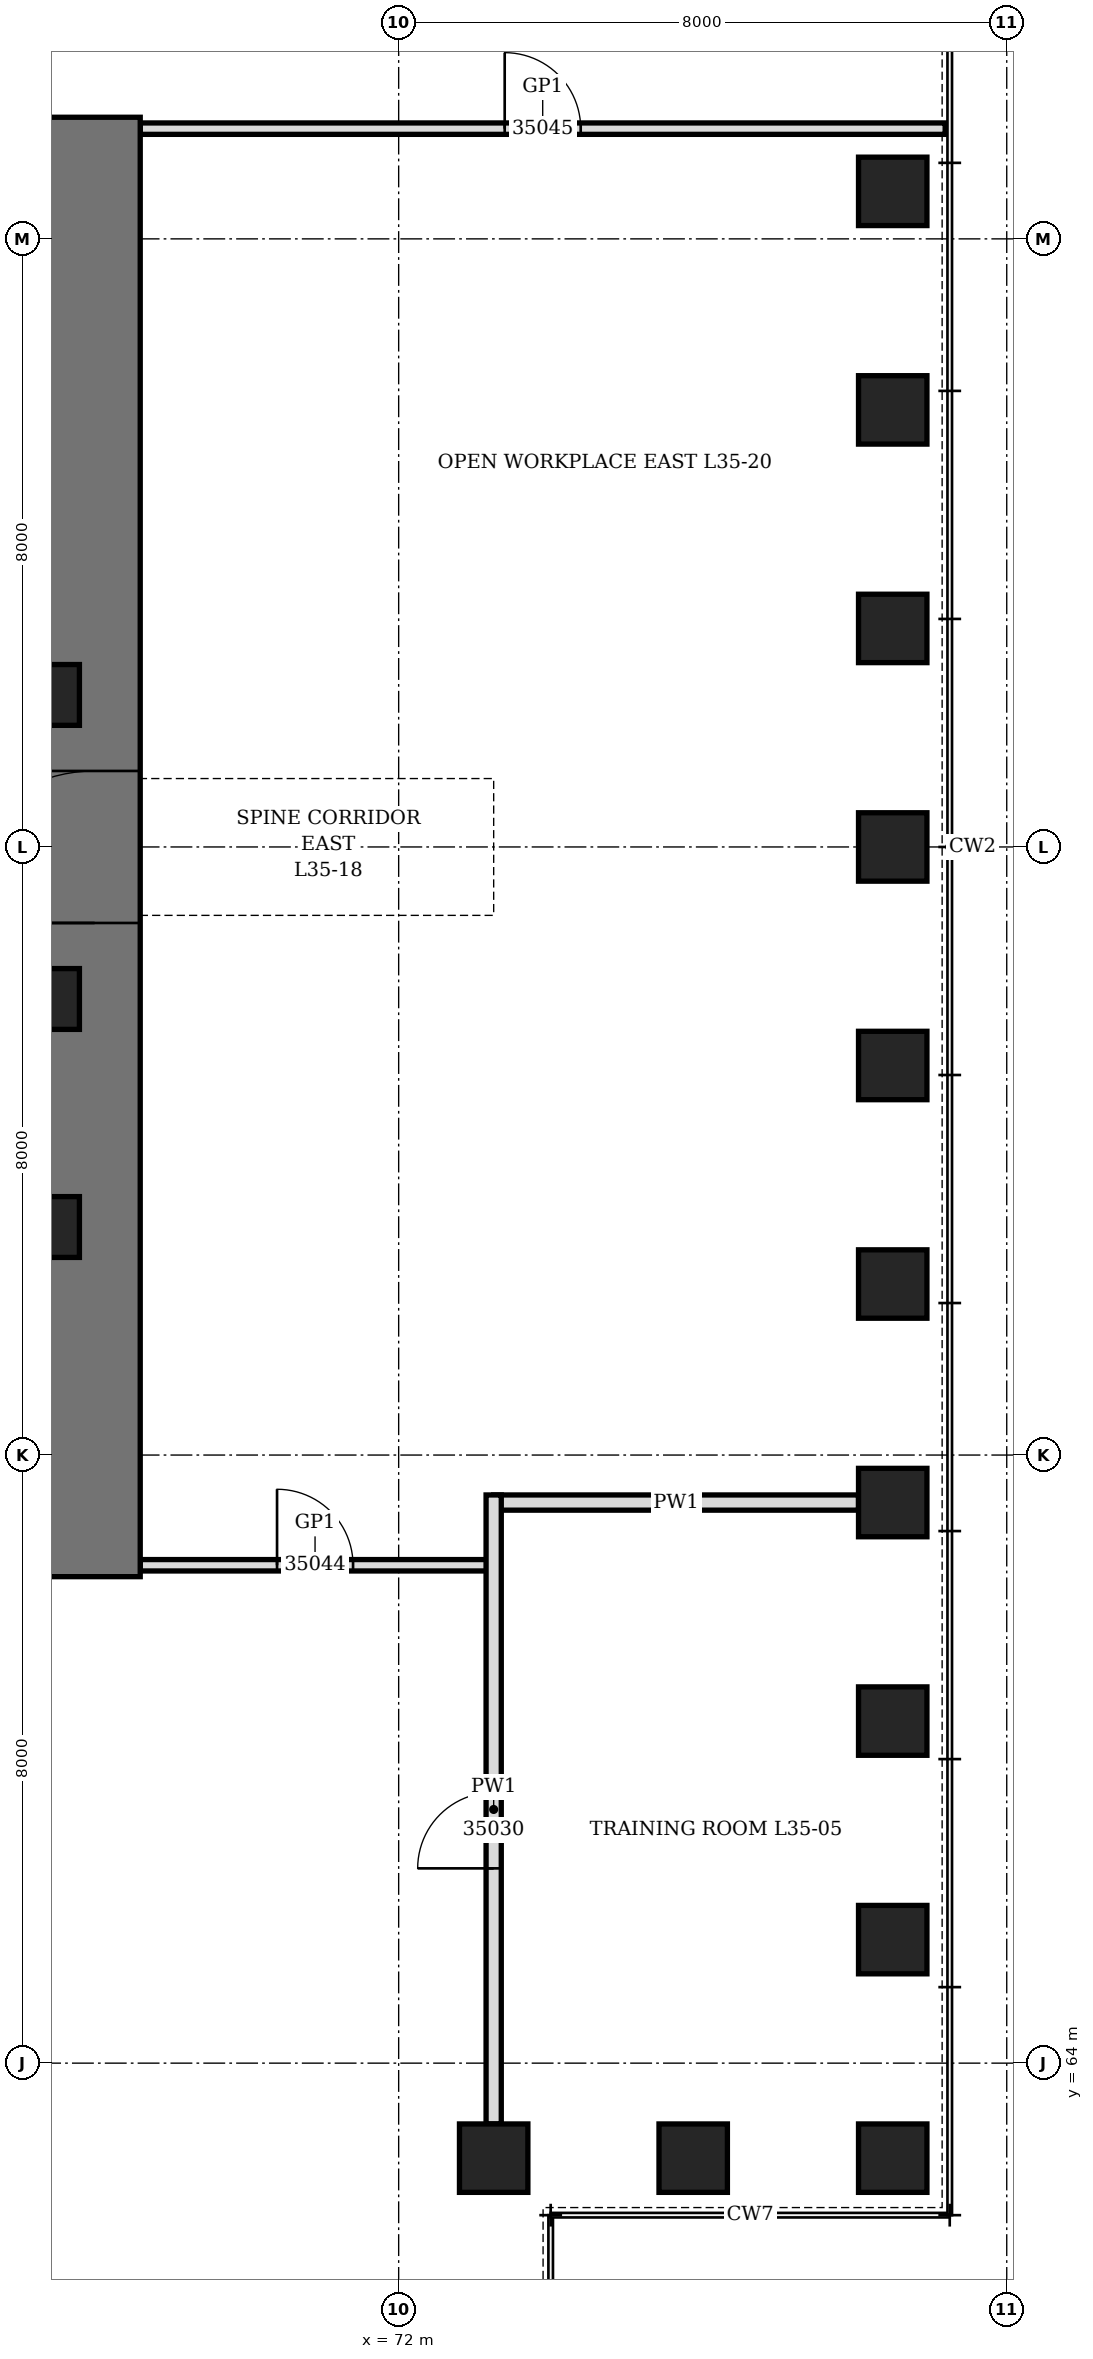
"""IFC4 building model, lengths in metres.
Left out: names, types, materials, properties, quantities, classifications, styles, units other than length and angle.
Written with IfcOpenShell. Run it as: python <this file> out.ifc"""

import sys

from ifc_helpers import new_model, si_unit, direction, frame, frame_2d, origin, origin_2d, place, context, subcontext, project, spatial, rectangle, hollow_rectangle, extrude, element, fill, save


model = new_model("IFC4")
c1 = context("Model", 3, precision=1e-05, world=origin(), true_north=direction((0.0, 1.0)))
c2 = subcontext(c1, "Body", "Model", "MODEL_VIEW")
j1 = project(units=[si_unit("LENGTHUNIT", "METRE"), si_unit("PLANEANGLEUNIT", "RADIAN")], contexts=[c1])
p1 = place(None, origin())
s1 = spatial("IfcSite", under=j1, at=p1, CompositionType="ELEMENT")
p2 = place(p1, origin())
s2 = spatial("IfcBuilding", under=s1, at=p2, CompositionType="ELEMENT")
p3 = place(p2, frame((0.0, 0.0, 158.5)))
s3 = spatial("IfcBuildingStorey", under=s2, at=p3, CompositionType="ELEMENT", Elevation=158.5)
for number, where, z_axis, x_axis in (
    (1, (73.25, 62.75, 0.0), (0.0, 0.0, 1.0), (1.0, 0.0, 0.0)),
    (2, (75.875, 62.75, 0.0), (0.0, 0.0, 1.0), (1.0, 0.0, 0.0)),
    (3, (78.5, 62.75, 0.0), (0.0, 0.0, 1.0), (0.0, 1.0, 0.0)),
    (4, (78.5, 65.625, 0.0), (0.0, 0.0, 1.0), (0.0, 1.0, 0.0)),
    (5, (78.5, 68.5, 0.0), (0.0, 0.0, 1.0), (0.0, 1.0, 0.0)),
    (6, (78.5, 71.375, 0.0), (0.0, 0.0, 1.0), (0.0, 1.0, 0.0)),
    (7, (78.5, 74.25, 0.0), (0.0, 0.0, 1.0), (0.0, 1.0, 0.0)),
    (8, (78.5, 77.125, 0.0), (0.0, 0.0, 1.0), (0.0, 1.0, 0.0)),
    (9, (78.5, 80.0, 0.0), (0.0, 0.0, 1.0), (0.0, 1.0, 0.0)),
    (10, (78.5, 82.875, 0.0), (0.0, 0.0, 1.0), (0.0, 1.0, 0.0)),
    (11, (78.5, 85.75, 0.0), (0.0, 0.0, 1.0), (0.0, 1.0, 0.0)),
    (12, (78.5, 88.625, 0.0), (0.0, 0.0, 1.0), (0.0, 1.0, 0.0)),
):
    element("IfcColumn", number, at=place(p3, frame(where, z_axis=z_axis, x_axis=x_axis)), inside=s3, PredefinedType="COLUMN", context=c2, shape_type="SweptSolid", body=[
        extrude(hollow_rectangle(XDim=0.9, YDim=0.9, WallThickness=0.12, at=origin_2d()), origin(), (0.0, 0.0, 1.0), 4.2),
    ])
p4 = place(p3, frame((68.0, 70.4, 0.0), z_axis=(0.0, 0.0, 1.0), x_axis=(0.0, 1.0, 0.0)))
e13 = element("IfcWall", 13, at=p4, inside=s3, PredefinedType="SHEAR", context=c2, shape_type="SweptSolid", body=[
    extrude(rectangle(XDim=19.2, YDim=1.2, at=frame_2d((9.6, 0.0))), origin(), (0.0, 0.0, 1.0), 4.2),
])
p5 = place(p4, frame((8.6, 0.0, 0.0)))
e14 = element("IfcOpeningElement", 14, at=p5, cuts=e13, PredefinedType="OPENING", context=c2, shape_type="SweptSolid", body=[
    extrude(rectangle(XDim=2.0, YDim=2.4, at=frame_2d((1.0, 1.2))), frame((0.0, 0.61, 0.0), z_axis=(0.0, -1.0, 0.0), x_axis=(1.0, 0.0, 0.0)), (0.0, 0.0, 1.0), 1.22),
])
for number, where, z_axis, x_axis in (
    (15, (67.4, 75.0, 0.0), (0.0, 0.0, 1.0), (1.0, 0.0, 0.0)),
    (16, (67.4, 78.0, 0.0), (0.0, 0.0, 1.0), (1.0, 0.0, 0.0)),
    (17, (67.4, 82.0, 0.0), (0.0, 0.0, 1.0), (1.0, 0.0, 0.0)),
):
    element("IfcColumn", number, at=place(p3, frame(where, z_axis=z_axis, x_axis=x_axis)), inside=s3, PredefinedType="COLUMN", context=c2, shape_type="SweptSolid", body=[
        extrude(hollow_rectangle(XDim=0.8, YDim=0.8, WallThickness=0.1, at=origin_2d()), origin(), (0.0, 0.0, 1.0), 4.2),
    ])
p6 = place(p3, frame((73.25, 71.375, 0.0), z_axis=(0.0, 0.0, 1.0), x_axis=(1.0, 0.0, 0.0)))
e18 = element("IfcWall", 18, at=p6, inside=s3, PredefinedType="PARTITIONING", context=c2, shape_type="SweptSolid", body=[
    extrude(rectangle(XDim=4.8, YDim=0.2, at=frame_2d((2.4, 0.0))), origin(), (0.0, 0.0, 1.0), 3.428),
])
p7 = place(p3, frame((68.6, 70.55, 0.0), z_axis=(0.0, 0.0, 1.0), x_axis=(1.0, 0.0, 0.0)))
e19 = element("IfcWall", 19, at=p7, inside=s3, PredefinedType="PARTITIONING", context=c2, shape_type="SweptSolid", body=[
    extrude(rectangle(XDim=4.6, YDim=0.15, at=frame_2d((2.3, 0.0))), origin(), (0.0, 0.0, 1.0), 4.04),
])
p8 = place(p7, frame((1.8, 0.0, 0.0)))
e20 = element("IfcOpeningElement", 20, at=p8, cuts=e19, PredefinedType="OPENING", context=c2, shape_type="SweptSolid", body=[
    extrude(rectangle(XDim=1.0, YDim=2.4, at=frame_2d((0.5, 1.2))), frame((0.0, 0.085, 0.0), z_axis=(0.0, -1.0, 0.0), x_axis=(1.0, 0.0, 0.0)), (0.0, 0.0, 1.0), 0.17),
])
p9 = place(p3, frame((68.6, 89.45, 0.0), z_axis=(0.0, 0.0, 1.0), x_axis=(1.0, 0.0, 0.0)))
e21 = element("IfcWall", 21, at=p9, inside=s3, PredefinedType="PARTITIONING", context=c2, shape_type="SweptSolid", body=[
    extrude(rectangle(XDim=10.59, YDim=0.15, at=frame_2d((5.295, 0.0))), origin(), (0.0, 0.0, 1.0), 4.04),
])
p10 = place(p9, frame((4.795, 0.0, 0.0)))
e22 = element("IfcOpeningElement", 22, at=p10, cuts=e21, PredefinedType="OPENING", context=c2, shape_type="SweptSolid", body=[
    extrude(rectangle(XDim=1.0, YDim=2.4, at=frame_2d((0.5, 1.2))), frame((0.0, 0.085, 0.0), z_axis=(0.0, -1.0, 0.0), x_axis=(1.0, 0.0, 0.0)), (0.0, 0.0, 1.0), 0.17),
])
p11 = place(p3, frame((73.25, 63.2, 0.0), z_axis=(0.0, 0.0, 1.0), x_axis=(0.0, 1.0, 0.0)))
e23 = element("IfcWall", 23, at=p11, inside=s3, PredefinedType="PARTITIONING", context=c2, shape_type="SweptSolid", body=[
    extrude(rectangle(XDim=8.275, YDim=0.2, at=frame_2d((4.138, 0.0))), origin(), (0.0, 0.0, 1.0), 4.04),
])
p12 = place(p11, frame((3.363, 0.0, 0.0)))
e24 = element("IfcOpeningElement", 24, at=p12, cuts=e23, PredefinedType="OPENING", context=c2, shape_type="SweptSolid", body=[
    extrude(rectangle(XDim=1.0, YDim=2.1, at=frame_2d((0.5, 1.05))), frame((0.0, 0.11, 0.0), z_axis=(0.0, -1.0, 0.0), x_axis=(1.0, 0.0, 0.0)), (0.0, 0.0, 1.0), 0.22),
])
p13 = place(p5, origin())
e25 = element("IfcDoor", 25, at=p13, inside=s3, OperationType="DOUBLE_DOOR_SINGLE_SWING", PredefinedType="DOOR", context=c2, shape_type="SweptSolid", body=[
    extrude(rectangle(XDim=2.0, YDim=2.4, at=frame_2d((1.0, 1.2))), frame((0.0, 0.35, 0.0), z_axis=(0.0, -1.0, 0.0), x_axis=(1.0, 0.0, 0.0)), (0.0, 0.0, 1.0), 0.7),
])
fill(e14, e25)
p14 = place(p12, origin())
e26 = element("IfcDoor", 26, at=p14, inside=s3, OperationType="SINGLE_SWING_LEFT", PredefinedType="DOOR", context=c2, shape_type="SweptSolid", body=[
    extrude(rectangle(XDim=1.0, YDim=2.1, at=frame_2d((0.5, 1.05))), frame((0.0, 0.1, 0.0), z_axis=(0.0, -1.0, 0.0), x_axis=(1.0, 0.0, 0.0)), (0.0, 0.0, 1.0), 0.199),
])
fill(e24, e26)
p15 = place(p8, origin())
e27 = element("IfcDoor", 27, at=p15, inside=s3, OperationType="SINGLE_SWING_RIGHT", PredefinedType="DOOR", context=c2, shape_type="SweptSolid", body=[
    extrude(rectangle(XDim=1.0, YDim=2.4, at=frame_2d((0.5, 1.2))), frame((0.0, 0.075, 0.0), z_axis=(0.0, -1.0, 0.0), x_axis=(1.0, 0.0, 0.0)), (0.0, 0.0, 1.0), 0.149),
])
fill(e20, e27)
p16 = place(p10, origin())
e28 = element("IfcDoor", 28, at=p16, inside=s3, OperationType="SINGLE_SWING_RIGHT", PredefinedType="DOOR", context=c2, shape_type="SweptSolid", body=[
    extrude(rectangle(XDim=1.0, YDim=2.4, at=frame_2d((0.5, 1.2))), frame((0.0, 0.075, 0.0), z_axis=(0.0, -1.0, 0.0), x_axis=(1.0, 0.0, 0.0)), (0.0, 0.0, 1.0), 0.149),
])
fill(e22, e28)
save(model, sys.argv[1])
